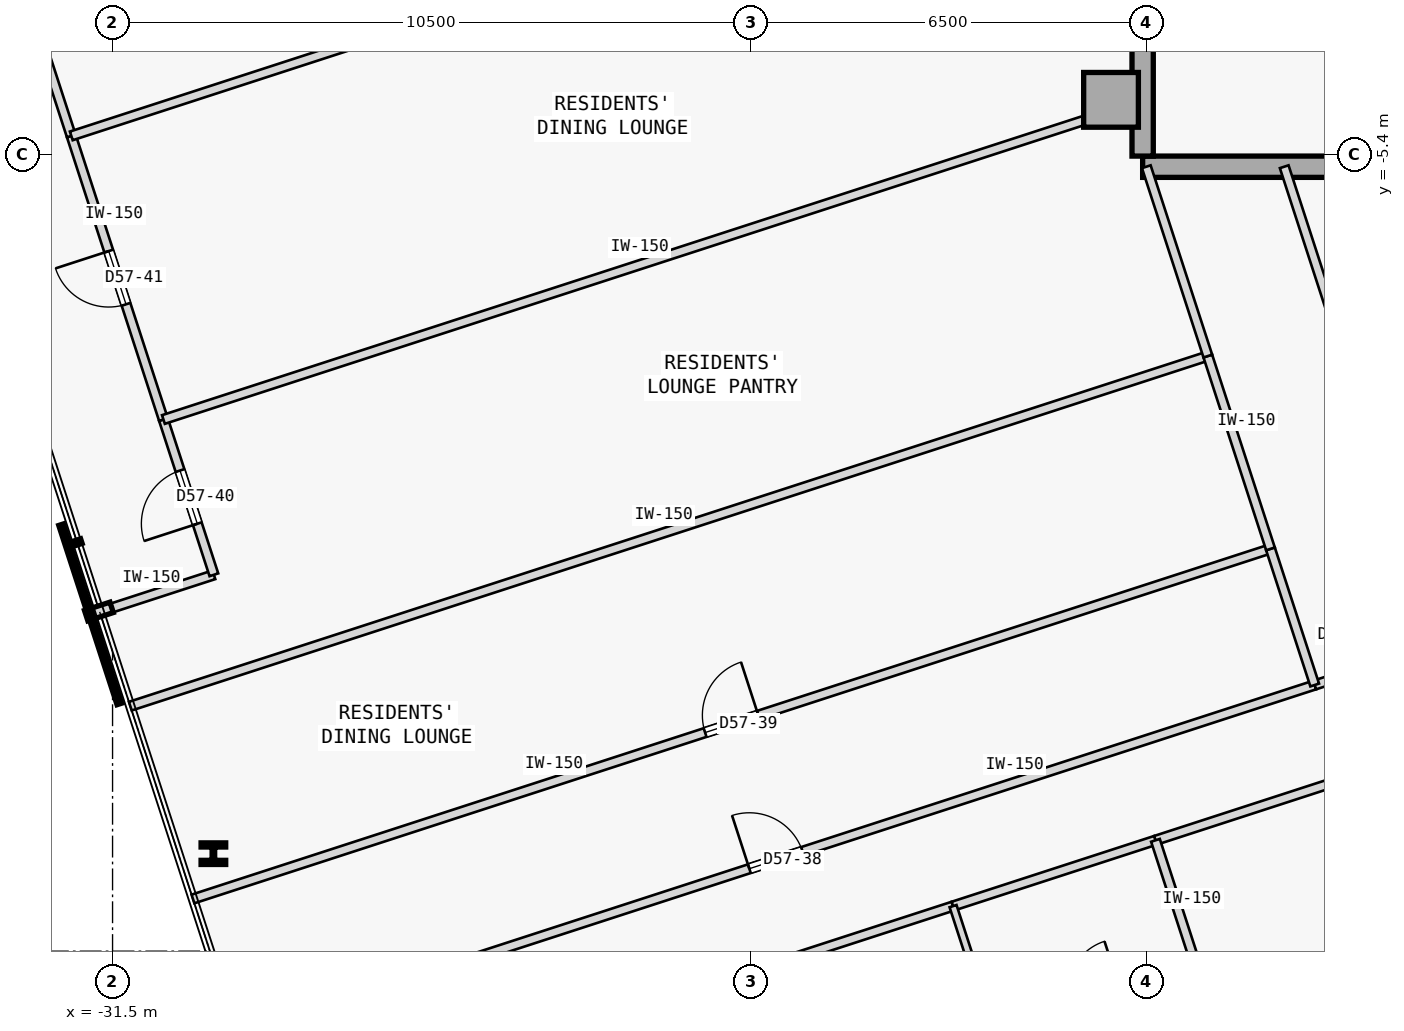
"""IFC4 building model, lengths in metres.
Left out: names, types, materials, properties, quantities, classifications, styles, units other than length and angle.
Written with IfcOpenShell. Run it as: python <this file> out.ifc"""

import sys

from ifc_helpers import new_model, si_unit, direction, frame, frame_2d, origin, origin_2d, place, context, subcontext, project, spatial, rectangle, i_section, extrude, element, fill, save


model = new_model("IFC4")
c1 = context("Model", 3, precision=1e-05, world=origin(), true_north=direction((0.0, 1.0)))
c2 = subcontext(c1, "Body", "Model", "MODEL_VIEW")
j1 = project(units=[si_unit("LENGTHUNIT", "METRE"), si_unit("PLANEANGLEUNIT", "RADIAN")], contexts=[c1])
p1 = place(None, origin())
s1 = spatial("IfcSite", under=j1, at=p1, CompositionType="ELEMENT")
p2 = place(p1, origin())
s2 = spatial("IfcBuilding", under=s1, at=p2, CompositionType="ELEMENT")
p3 = place(p2, frame((0.0, 0.0, 217.6)))
s3 = spatial("IfcBuildingStorey", under=s2, at=p3, CompositionType="ELEMENT", Elevation=217.6)
p4 = place(p3, frame((-15.08, -4.5, 0.0), z_axis=(0.0, 0.0, 1.0), x_axis=(1.0, 0.0, 0.0)))
e1 = element("IfcColumn", 1, at=p4, inside=s3, PredefinedType="COLUMN", context=c2, shape_type="SweptSolid", body=[
    extrude(rectangle(XDim=0.9, YDim=0.9, at=origin_2d()), origin(), (0.0, 0.0, 1.0), 3.35),
])
p5 = place(p3, frame((-14.56, -5.6, 0.0), z_axis=(0.0, 0.0, 1.0), x_axis=(1.0, 0.0, 0.0)))
e2 = element("IfcWall", 2, at=p5, inside=s3, PredefinedType="SHEAR", context=c2, shape_type="SweptSolid", body=[
    extrude(rectangle(XDim=10.86, YDim=0.35, at=frame_2d((5.43, 0.0))), origin(), (0.0, 0.0, 1.0), 3.125),
])
p6 = place(p3, frame((-14.56, -5.425, 0.0), z_axis=(0.0, 0.0, 1.0), x_axis=(0.0, 1.0, 0.0)))
e3 = element("IfcWall", 3, at=p6, inside=s3, PredefinedType="SHEAR", context=c2, shape_type="SweptSolid", body=[
    extrude(rectangle(XDim=10.85, YDim=0.35, at=frame_2d((5.425, 0.0))), origin(), (0.0, 0.0, 1.0), 3.125),
])
p7 = place(p3, frame((-29.842, -16.897, 0.0), z_axis=(0.0, 0.0, 1.0), x_axis=(1.0, 0.0, 0.0)))
e4 = element("IfcColumn", 4, at=p7, inside=s3, PredefinedType="COLUMN", context=c2, shape_type="SweptSolid", body=[
    extrude(i_section(OverallWidth=0.405, OverallDepth=0.355, WebThickness=0.042, FlangeThickness=0.068, FilletRadius=0.015, at=origin_2d()), origin(), (0.0, 0.0, 1.0), 3.35),
])
p8 = place(p3, frame((-14.349, -16.677, 0.0), z_axis=(0.0, 0.0, 1.0), x_axis=(0.951058958043, 0.309009479345, 0.0)))
e5 = element("IfcWall", 5, at=p8, inside=s3, PredefinedType="PARTITIONING", context=c2, shape_type="SweptSolid", body=[
    extrude(rectangle(XDim=7.64, YDim=0.15, at=frame_2d((3.82, 0.0))), origin(), (0.0, 0.0, 1.0), 3.125),
])
p9 = place(p8, frame((3.345, 0.0, 0.0)))
e6 = element("IfcOpeningElement", 6, at=p9, cuts=e5, PredefinedType="OPENING", context=c2, shape_type="SweptSolid", body=[
    extrude(rectangle(XDim=0.95, YDim=2.15, at=frame_2d((0.475, 1.075))), frame((0.0, 0.085, 0.0), z_axis=(0.0, -1.0, 0.0), x_axis=(1.0, 0.0, 0.0)), (0.0, 0.0, 1.0), 0.17),
])
p10 = place(p3, frame((-21.815, -19.103, 0.0), z_axis=(0.0, 0.0, 1.0), x_axis=(0.951057987102, 0.309012467661, 0.0)))
e7 = element("IfcWall", 7, at=p10, inside=s3, PredefinedType="PARTITIONING", context=c2, shape_type="SweptSolid", body=[
    extrude(rectangle(XDim=4.35, YDim=0.15, at=frame_2d((2.175, 0.0))), origin(), (0.0, 0.0, 1.0), 3.125),
])
p11 = place(p3, frame((-17.678, -17.759, 0.0), z_axis=(0.0, 0.0, 1.0), x_axis=(0.951055596592, 0.309019824916, 0.0)))
e8 = element("IfcWall", 8, at=p11, inside=s3, PredefinedType="PARTITIONING", context=c2, shape_type="SweptSolid", body=[
    extrude(rectangle(XDim=3.5, YDim=0.15, at=frame_2d((1.75, 0.0))), origin(), (0.0, 0.0, 1.0), 3.125),
])
p12 = place(p3, frame((-29.45, -19.881, 0.0), z_axis=(0.0, 0.0, 1.0), x_axis=(0.95105650271, 0.309017036186, 0.0)))
e9 = element("IfcWall", 9, at=p12, inside=s3, PredefinedType="PARTITIONING", context=c2, shape_type="SweptSolid", body=[
    extrude(rectangle(XDim=18.632, YDim=0.15, at=frame_2d((9.316, 0.0))), origin(), (0.0, 0.0, 1.0), 3.125),
])
p13 = place(p12, frame((8.856, 0.0, 0.0)))
e10 = element("IfcOpeningElement", 10, at=p13, cuts=e9, PredefinedType="OPENING", context=c2, shape_type="SweptSolid", body=[
    extrude(rectangle(XDim=0.92, YDim=2.15, at=frame_2d((0.46, 1.075))), frame((0.0, 0.085, 0.0), z_axis=(0.0, -1.0, 0.0), x_axis=(1.0, 0.0, 0.0)), (0.0, 0.0, 1.0), 0.17),
])
p14 = place(p3, frame((-31.712, -12.921, 0.0), z_axis=(0.0, 0.0, 1.0), x_axis=(0.951054051148, 0.309024581215, 0.0)))
e11 = element("IfcWall", 11, at=p14, inside=s3, PredefinedType="PARTITIONING", context=c2, shape_type="SweptSolid", body=[
    extrude(rectangle(XDim=1.975, YDim=0.15, at=frame_2d((0.988, 0.0))), origin(), (0.0, 0.0, 1.0), 3.125),
])
p15 = place(p3, frame((-29.833, -12.311, 0.0), z_axis=(0.0, 0.0, 1.0), x_axis=(-0.309044953986, 0.951047431213, 0.0)))
e12 = element("IfcWall", 12, at=p15, inside=s3, PredefinedType="PARTITIONING", context=c2, shape_type="SweptSolid", body=[
    extrude(rectangle(XDim=2.685, YDim=0.15, at=frame_2d((1.343, 0.0))), origin(), (0.0, 0.0, 1.0), 3.125),
])
p16 = place(p15, frame((0.883, 0.0, 0.0)))
e13 = element("IfcOpeningElement", 13, at=p16, cuts=e12, PredefinedType="OPENING", context=c2, shape_type="SweptSolid", body=[
    extrude(rectangle(XDim=0.92, YDim=2.15, at=frame_2d((0.46, 1.075))), frame((0.0, 0.085, 0.0), z_axis=(0.0, -1.0, 0.0), x_axis=(1.0, 0.0, 0.0)), (0.0, 0.0, 1.0), 0.17),
])
p17 = place(p3, frame((-30.663, -9.757, 0.0), z_axis=(0.0, 0.0, 1.0), x_axis=(-0.309019653166, 0.951055652397, 0.0)))
e14 = element("IfcWall", 14, at=p17, inside=s3, PredefinedType="PARTITIONING", context=c2, shape_type="SweptSolid", body=[
    extrude(rectangle(XDim=4.904, YDim=0.15, at=frame_2d((2.452, 0.0))), origin(), (0.0, 0.0, 1.0), 3.125),
])
p18 = place(p17, frame((1.992, 0.0, 0.0)))
e15 = element("IfcOpeningElement", 15, at=p18, cuts=e14, PredefinedType="OPENING", context=c2, shape_type="SweptSolid", body=[
    extrude(rectangle(XDim=0.92, YDim=2.15, at=frame_2d((0.46, 1.075))), frame((0.0, 0.085, 0.0), z_axis=(0.0, -1.0, 0.0), x_axis=(1.0, 0.0, 0.0)), (0.0, 0.0, 1.0), 0.17),
])
p19 = place(p3, frame((-32.179, -5.093, 0.0), z_axis=(0.0, 0.0, 1.0), x_axis=(-0.309014532869, 0.951057316083, 0.0)))
e16 = element("IfcWall", 16, at=p19, inside=s3, PredefinedType="PARTITIONING", context=c2, shape_type="SweptSolid", body=[
    extrude(rectangle(XDim=4.707, YDim=0.15, at=frame_2d((2.354, 0.0))), origin(), (0.0, 0.0, 1.0), 3.125),
])
p20 = place(p3, frame((-11.73, -14.123, 0.0), z_axis=(0.0, 0.0, 1.0), x_axis=(0.951066501686, 0.308986260812, 0.0)))
e17 = element("IfcWall", 17, at=p20, inside=s3, PredefinedType="PARTITIONING", context=c2, shape_type="SweptSolid", body=[
    extrude(rectangle(XDim=2.157, YDim=0.15, at=frame_2d((1.079, 0.0))), origin(), (0.0, 0.0, 1.0), 3.125),
])
p21 = place(p20, frame((0.618, 0.0, 0.0)))
e18 = element("IfcOpeningElement", 18, at=p21, cuts=e17, PredefinedType="OPENING", context=c2, shape_type="SweptSolid", body=[
    extrude(rectangle(XDim=0.92, YDim=2.15, at=frame_2d((0.46, 1.075))), frame((0.0, 0.085, 0.0), z_axis=(0.0, -1.0, 0.0), x_axis=(1.0, 0.0, 0.0)), (0.0, 0.0, 1.0), 0.17),
])
p22 = place(p3, frame((-13.669, -18.77, 0.0), z_axis=(0.0, 0.0, 1.0), x_axis=(-0.309060979314, 0.951042223598, 0.0)))
e19 = element("IfcWall", 19, at=p22, inside=s3, PredefinedType="PARTITIONING", context=c2, shape_type="SweptSolid", body=[
    extrude(rectangle(XDim=2.2, YDim=0.15, at=frame_2d((1.1, 0.0))), origin(), (0.0, 0.0, 1.0), 3.125),
])
p23 = place(p3, frame((-16.998, -19.851, 0.0), z_axis=(0.0, 0.0, 1.0), x_axis=(-0.30892799396, 0.951085429679, 0.0)))
e20 = element("IfcWall", 20, at=p23, inside=s3, PredefinedType="PARTITIONING", context=c2, shape_type="SweptSolid", body=[
    extrude(rectangle(XDim=2.2, YDim=0.12, at=frame_2d((1.1, 0.0))), origin(), (0.0, 0.0, 1.0), 3.125),
])
p24 = place(p3, frame((-30.178, -17.642, 0.0), z_axis=(0.0, 0.0, 1.0), x_axis=(0.95105650271, 0.309017036186, 0.0)))
e21 = element("IfcWall", 21, at=p24, inside=s3, PredefinedType="PARTITIONING", context=c2, shape_type="SweptSolid", body=[
    extrude(rectangle(XDim=18.632, YDim=0.15, at=frame_2d((9.316, 0.0))), origin(), (0.0, 0.0, 1.0), 3.125),
])
p25 = place(p24, frame((8.856, 0.0, 0.0)))
e22 = element("IfcOpeningElement", 22, at=p25, cuts=e21, PredefinedType="OPENING", context=c2, shape_type="SweptSolid", body=[
    extrude(rectangle(XDim=0.92, YDim=2.15, at=frame_2d((0.46, 1.075))), frame((0.0, 0.085, 0.0), z_axis=(0.0, -1.0, 0.0), x_axis=(1.0, 0.0, 0.0)), (0.0, 0.0, 1.0), 0.17),
])
p26 = place(p3, frame((-11.73, -14.123, 0.0), z_axis=(0.0, 0.0, 1.0), x_axis=(-0.309062621189, 0.951041690035, 0.0)))
e23 = element("IfcWall", 23, at=p26, inside=s3, PredefinedType="PARTITIONING", context=c2, shape_type="SweptSolid", body=[
    extrude(rectangle(XDim=2.354, YDim=0.15, at=frame_2d((1.177, 0.0))), origin(), (0.0, 0.0, 1.0), 3.125),
])
p27 = place(p3, frame((-31.208, -14.471, 0.0), z_axis=(0.0, 0.0, 1.0), x_axis=(0.951057753948, 0.309013185244, 0.0)))
e24 = element("IfcWall", 24, at=p27, inside=s3, PredefinedType="PARTITIONING", context=c2, shape_type="SweptSolid", body=[
    extrude(rectangle(XDim=18.632, YDim=0.15, at=frame_2d((9.316, 0.0))), origin(), (0.0, 0.0, 1.0), 3.125),
])
p28 = place(p3, frame((-12.458, -11.884, 0.0), z_axis=(0.0, 0.0, 1.0), x_axis=(-0.308946982245, 0.951079261766, 0.0)))
e25 = element("IfcWall", 25, at=p28, inside=s3, PredefinedType="PARTITIONING", context=c2, shape_type="SweptSolid", body=[
    extrude(rectangle(XDim=3.334, YDim=0.15, at=frame_2d((1.667, 0.0))), origin(), (0.0, 0.0, 1.0), 3.125),
])
p29 = place(p3, frame((-30.663, -9.757, 0.0), z_axis=(0.0, 0.0, 1.0), x_axis=(0.951058192995, 0.309011833974, 0.0)))
e26 = element("IfcWall", 26, at=p29, inside=s3, PredefinedType="PARTITIONING", context=c2, shape_type="SweptSolid", body=[
    extrude(rectangle(XDim=16.657, YDim=0.15, at=frame_2d((8.329, 0.0))), origin(), (0.0, 0.0, 1.0), 3.125),
])
p30 = place(p3, frame((-13.488, -8.713, 0.0), z_axis=(0.0, 0.0, 1.0), x_axis=(-0.309082700143, 0.951035164687, 0.0)))
e27 = element("IfcWall", 27, at=p30, inside=s3, PredefinedType="PARTITIONING", context=c2, shape_type="SweptSolid", body=[
    extrude(rectangle(XDim=3.274, YDim=0.15, at=frame_2d((1.637, 0.0))), origin(), (0.0, 0.0, 1.0), 3.125),
])
p31 = place(p3, frame((-32.179, -5.093, 0.0), z_axis=(0.0, 0.0, 1.0), x_axis=(0.951053885426, 0.309025091239, 0.0)))
e28 = element("IfcWall", 28, at=p31, inside=s3, PredefinedType="PARTITIONING", context=c2, shape_type="SweptSolid", body=[
    extrude(rectangle(XDim=16.657, YDim=0.15, at=frame_2d((8.329, 0.0))), origin(), (0.0, 0.0, 1.0), 3.125),
])
p32 = place(p3, frame((-9.679, -13.457, 0.0), z_axis=(0.0, 0.0, 1.0), x_axis=(-0.309010558951, 0.951058607267, 0.0)))
e29 = element("IfcWall", 29, at=p32, inside=s3, PredefinedType="PARTITIONING", context=c2, shape_type="SweptSolid", body=[
    extrude(rectangle(XDim=8.261, YDim=0.15, at=frame_2d((4.13, 0.0))), origin(), (0.0, 0.0, 1.0), 3.125),
])
p33 = place(p13, origin())
e30 = element("IfcDoor", 30, at=p33, inside=s3, OperationType="SINGLE_SWING_LEFT", PredefinedType="DOOR", context=c2, shape_type="SweptSolid", body=[
    extrude(rectangle(XDim=0.92, YDim=2.15, at=frame_2d((0.46, 1.075))), frame((0.0, 0.025, 0.0), z_axis=(0.0, -1.0, 0.0), x_axis=(1.0, 0.0, 0.0)), (0.0, 0.0, 1.0), 0.05),
])
fill(e10, e30)
p34 = place(p25, origin())
e31 = element("IfcDoor", 31, at=p34, inside=s3, OperationType="SINGLE_SWING_RIGHT", PredefinedType="DOOR", context=c2, shape_type="SweptSolid", body=[
    extrude(rectangle(XDim=0.92, YDim=2.15, at=frame_2d((0.46, 1.075))), frame((0.0, 0.025, 0.0), z_axis=(0.0, -1.0, 0.0), x_axis=(1.0, 0.0, 0.0)), (0.0, 0.0, 1.0), 0.05),
])
fill(e22, e31)
p35 = place(p16, origin())
e32 = element("IfcDoor", 32, at=p35, inside=s3, OperationType="SINGLE_SWING_LEFT", PredefinedType="DOOR", context=c2, shape_type="SweptSolid", body=[
    extrude(rectangle(XDim=0.92, YDim=2.15, at=frame_2d((0.46, 1.075))), frame((0.0, 0.025, 0.0), z_axis=(0.0, -1.0, 0.0), x_axis=(1.0, 0.0, 0.0)), (0.0, 0.0, 1.0), 0.05),
])
fill(e13, e32)
p36 = place(p18, origin())
e33 = element("IfcDoor", 33, at=p36, inside=s3, OperationType="SINGLE_SWING_RIGHT", PredefinedType="DOOR", context=c2, shape_type="SweptSolid", body=[
    extrude(rectangle(XDim=0.92, YDim=2.15, at=frame_2d((0.46, 1.075))), frame((0.0, 0.025, 0.0), z_axis=(0.0, -1.0, 0.0), x_axis=(1.0, 0.0, 0.0)), (0.0, 0.0, 1.0), 0.05),
])
fill(e15, e33)
save(model, sys.argv[1])
